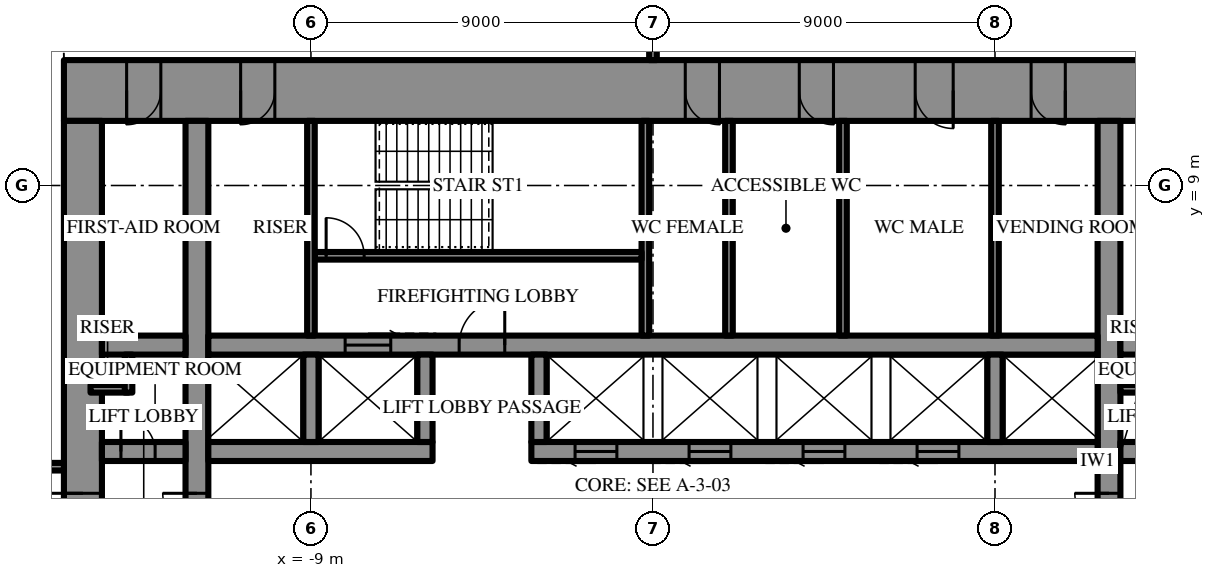
"""IFC4 building model, lengths in metres.
Left out: names, types, materials, properties, quantities, classifications, styles, units other than length and angle.
Written with IfcOpenShell. Run it as: python <this file> out.ifc"""

import sys

from ifc_helpers import new_model, si_unit, direction, frame, frame_2d, origin, place, context, subcontext, project, spatial, rectangle, extrude, element, fill, save


model = new_model("IFC4")
c1 = context("Model", 3, precision=1e-05, world=origin(), true_north=direction((0.0, 1.0)))
c2 = subcontext(c1, "Body", "Model", "MODEL_VIEW")
j1 = project(units=[si_unit("LENGTHUNIT", "METRE"), si_unit("PLANEANGLEUNIT", "RADIAN")], contexts=[c1])
p1 = place(None, origin())
s1 = spatial("IfcSite", under=j1, at=p1, CompositionType="ELEMENT")
p2 = place(p1, origin())
s2 = spatial("IfcBuilding", under=s1, at=p2, CompositionType="ELEMENT")
p3 = place(p2, frame((0.0, 0.0, 257.5)))
s3 = spatial("IfcBuildingStorey", under=s2, at=p3, CompositionType="ELEMENT", Elevation=257.5)
p4 = place(p3, frame((-15.5, 11.5, 0.0), z_axis=(0.0, 0.0, 1.0), x_axis=(1.0, 0.0, 0.0)))
e1 = element("IfcWall", 1, at=p4, inside=s3, PredefinedType="SHEAR", context=c2, shape_type="SweptSolid", body=[
    extrude(rectangle(XDim=31.0, YDim=1.6, at=frame_2d((15.5, 0.0))), origin(), (0.0, 0.0, 1.0), 4.2),
])
p5 = place(p4, frame((16.35, 0.0, 0.0)))
e2 = element("IfcOpeningElement", 2, at=p5, cuts=e1, PredefinedType="OPENING", context=c2, shape_type="SweptSolid", body=[
    extrude(rectangle(XDim=0.9, YDim=2.2, at=frame_2d((0.45, 1.1))), frame((0.0, 0.81, 0.0), z_axis=(0.0, -1.0, 0.0), x_axis=(1.0, 0.0, 0.0)), (0.0, 0.0, 1.0), 1.62),
])
p6 = place(p4, frame((19.35, 0.0, 0.0)))
e3 = element("IfcOpeningElement", 3, at=p6, cuts=e1, PredefinedType="OPENING", context=c2, shape_type="SweptSolid", body=[
    extrude(rectangle(XDim=0.9, YDim=2.2, at=frame_2d((0.45, 1.1))), frame((0.0, 0.81, 0.0), z_axis=(0.0, -1.0, 0.0), x_axis=(1.0, 0.0, 0.0)), (0.0, 0.0, 1.0), 1.62),
])
p7 = place(p4, frame((22.4, 0.0, 0.0)))
e4 = element("IfcOpeningElement", 4, at=p7, cuts=e1, PredefinedType="OPENING", context=c2, shape_type="SweptSolid", body=[
    extrude(rectangle(XDim=1.0, YDim=2.2, at=frame_2d((0.5, 1.1))), frame((0.0, 0.81, 0.0), z_axis=(0.0, -1.0, 0.0), x_axis=(1.0, 0.0, 0.0)), (0.0, 0.0, 1.0), 1.62),
])
p8 = place(p4, frame((1.65, 0.0, 0.0)))
e5 = element("IfcOpeningElement", 5, at=p8, cuts=e1, PredefinedType="OPENING", context=c2, shape_type="SweptSolid", body=[
    extrude(rectangle(XDim=0.9, YDim=2.2, at=frame_2d((0.45, 1.1))), frame((0.0, 0.81, 0.0), z_axis=(0.0, -1.0, 0.0), x_axis=(1.0, 0.0, 0.0)), (0.0, 0.0, 1.0), 1.62),
])
p9 = place(p4, frame((4.65, 0.0, 0.0)))
e6 = element("IfcOpeningElement", 6, at=p9, cuts=e1, PredefinedType="OPENING", context=c2, shape_type="SweptSolid", body=[
    extrude(rectangle(XDim=0.9, YDim=2.2, at=frame_2d((0.45, 1.1))), frame((0.0, 0.81, 0.0), z_axis=(0.0, -1.0, 0.0), x_axis=(1.0, 0.0, 0.0)), (0.0, 0.0, 1.0), 1.62),
])
p10 = place(p4, frame((25.45, 0.0, 0.0)))
e7 = element("IfcOpeningElement", 7, at=p10, cuts=e1, PredefinedType="OPENING", context=c2, shape_type="SweptSolid", body=[
    extrude(rectangle(XDim=0.9, YDim=2.2, at=frame_2d((0.45, 1.1))), frame((0.0, 0.81, 0.0), z_axis=(0.0, -1.0, 0.0), x_axis=(1.0, 0.0, 0.0)), (0.0, 0.0, 1.0), 1.62),
])
p11 = place(p4, frame((28.45, 0.0, 0.0)))
e8 = element("IfcOpeningElement", 8, at=p11, cuts=e1, PredefinedType="OPENING", context=c2, shape_type="SweptSolid", body=[
    extrude(rectangle(XDim=0.9, YDim=2.2, at=frame_2d((0.45, 1.1))), frame((0.0, 0.81, 0.0), z_axis=(0.0, -1.0, 0.0), x_axis=(1.0, 0.0, 0.0)), (0.0, 0.0, 1.0), 1.62),
])
p12 = place(p3, frame((-15.0, 10.7, 0.0), z_axis=(0.0, 0.0, 1.0), x_axis=(0.0, -1.0, 0.0)))
e9 = element("IfcWall", 9, at=p12, inside=s3, PredefinedType="SHEAR", context=c2, shape_type="SweptSolid", body=[
    extrude(rectangle(XDim=21.4, YDim=1.0, at=frame_2d((10.7, 0.0))), origin(), (0.0, 0.0, 1.0), 4.2),
])
p13 = place(p12, frame((9.8, 0.0, 0.0)))
e10 = element("IfcOpeningElement", 10, at=p13, cuts=e9, PredefinedType="OPENING", context=c2, shape_type="SweptSolid", body=[
    extrude(rectangle(XDim=1.8, YDim=2.4, at=frame_2d((0.9, 1.2))), frame((0.0, 0.51, 0.0), z_axis=(0.0, -1.0, 0.0), x_axis=(1.0, 0.0, 0.0)), (0.0, 0.0, 1.0), 1.02),
])
p14 = place(p3, frame((12.0, -10.7, 0.0), z_axis=(0.0, 0.0, 1.0), x_axis=(0.0, 1.0, 0.0)))
e11 = element("IfcWall", 11, at=p14, inside=s3, PredefinedType="SHEAR", context=c2, shape_type="SweptSolid", body=[
    extrude(rectangle(XDim=21.4, YDim=0.6, at=frame_2d((10.7, 0.0))), origin(), (0.0, 0.0, 1.0), 4.2),
])
p15 = place(p14, frame((9.8, 0.0, 0.0)))
e12 = element("IfcOpeningElement", 12, at=p15, cuts=e11, PredefinedType="OPENING", context=c2, shape_type="SweptSolid", body=[
    extrude(rectangle(XDim=1.8, YDim=2.4, at=frame_2d((0.9, 1.2))), frame((0.0, 0.31, 0.0), z_axis=(0.0, -1.0, 0.0), x_axis=(1.0, 0.0, 0.0)), (0.0, 0.0, 1.0), 0.62),
])
p16 = place(p3, frame((-12.0, -10.7, 0.0), z_axis=(0.0, 0.0, 1.0), x_axis=(0.0, 1.0, 0.0)))
e13 = element("IfcWall", 13, at=p16, inside=s3, PredefinedType="SHEAR", context=c2, shape_type="SweptSolid", body=[
    extrude(rectangle(XDim=21.4, YDim=0.6, at=frame_2d((10.7, 0.0))), origin(), (0.0, 0.0, 1.0), 4.2),
])
p17 = place(p16, frame((9.8, 0.0, 0.0)))
e14 = element("IfcOpeningElement", 14, at=p17, cuts=e13, PredefinedType="OPENING", context=c2, shape_type="SweptSolid", body=[
    extrude(rectangle(XDim=1.8, YDim=2.4, at=frame_2d((0.9, 1.2))), frame((0.0, 0.31, 0.0), z_axis=(0.0, -1.0, 0.0), x_axis=(1.0, 0.0, 0.0)), (0.0, 0.0, 1.0), 0.62),
])
p18 = place(p3, frame((-14.5, 2.0, 0.0), z_axis=(0.0, 0.0, 1.0), x_axis=(1.0, 0.0, 0.0)))
e15 = element("IfcWall", 15, at=p18, inside=s3, PredefinedType="SHEAR", context=c2, shape_type="SweptSolid", body=[
    extrude(rectangle(XDim=2.2, YDim=0.5, at=frame_2d((1.1, 0.0))), origin(), (0.0, 0.0, 1.0), 4.2),
])
p19 = place(p18, frame((0.5, 0.0, 0.0)))
e16 = element("IfcOpeningElement", 16, at=p19, cuts=e15, PredefinedType="OPENING", context=c2, shape_type="SweptSolid", body=[
    extrude(rectangle(XDim=0.9, YDim=2.2, at=frame_2d((0.45, 1.1))), frame((0.0, 0.26, 0.0), z_axis=(0.0, -1.0, 0.0), x_axis=(1.0, 0.0, 0.0)), (0.0, 0.0, 1.0), 0.52),
])
p20 = place(p3, frame((-11.7, 2.0, 0.0), z_axis=(0.0, 0.0, 1.0), x_axis=(1.0, 0.0, 0.0)))
e17 = element("IfcWall", 17, at=p20, inside=s3, PredefinedType="SHEAR", context=c2, shape_type="SweptSolid", body=[
    extrude(rectangle(XDim=5.9, YDim=0.5, at=frame_2d((2.95, 0.0))), origin(), (0.0, 0.0, 1.0), 4.2),
])
p21 = place(p3, frame((-3.2, 2.0, 0.0), z_axis=(0.0, 0.0, 1.0), x_axis=(1.0, 0.0, 0.0)))
e18 = element("IfcWall", 18, at=p21, inside=s3, PredefinedType="SHEAR", context=c2, shape_type="SweptSolid", body=[
    extrude(rectangle(XDim=14.9, YDim=0.5, at=frame_2d((7.45, 0.0))), origin(), (0.0, 0.0, 1.0), 4.2),
])
p22 = place(p21, frame((1.15, 0.0, 0.0)))
e19 = element("IfcOpeningElement", 19, at=p22, cuts=e18, PredefinedType="OPENING", context=c2, shape_type="SweptSolid", body=[
    extrude(rectangle(XDim=1.1, YDim=2.2, at=frame_2d((0.55, 1.1))), frame((0.0, 0.26, 0.0), z_axis=(0.0, -1.0, 0.0), x_axis=(1.0, 0.0, 0.0)), (0.0, 0.0, 1.0), 0.52),
])
p23 = place(p21, frame((4.15, 0.0, 0.0)))
e20 = element("IfcOpeningElement", 20, at=p23, cuts=e18, PredefinedType="OPENING", context=c2, shape_type="SweptSolid", body=[
    extrude(rectangle(XDim=1.1, YDim=2.2, at=frame_2d((0.55, 1.1))), frame((0.0, 0.26, 0.0), z_axis=(0.0, -1.0, 0.0), x_axis=(1.0, 0.0, 0.0)), (0.0, 0.0, 1.0), 0.52),
])
p24 = place(p21, frame((7.15, 0.0, 0.0)))
e21 = element("IfcOpeningElement", 21, at=p24, cuts=e18, PredefinedType="OPENING", context=c2, shape_type="SweptSolid", body=[
    extrude(rectangle(XDim=1.1, YDim=2.2, at=frame_2d((0.55, 1.1))), frame((0.0, 0.26, 0.0), z_axis=(0.0, -1.0, 0.0), x_axis=(1.0, 0.0, 0.0)), (0.0, 0.0, 1.0), 0.52),
])
p25 = place(p21, frame((10.15, 0.0, 0.0)))
e22 = element("IfcOpeningElement", 22, at=p25, cuts=e18, PredefinedType="OPENING", context=c2, shape_type="SweptSolid", body=[
    extrude(rectangle(XDim=1.1, YDim=2.2, at=frame_2d((0.55, 1.1))), frame((0.0, 0.26, 0.0), z_axis=(0.0, -1.0, 0.0), x_axis=(1.0, 0.0, 0.0)), (0.0, 0.0, 1.0), 0.52),
])
p26 = place(p3, frame((12.3, 2.0, 0.0), z_axis=(0.0, 0.0, 1.0), x_axis=(1.0, 0.0, 0.0)))
e23 = element("IfcWall", 23, at=p26, inside=s3, PredefinedType="SHEAR", context=c2, shape_type="SweptSolid", body=[
    extrude(rectangle(XDim=2.2, YDim=0.5, at=frame_2d((1.1, 0.0))), origin(), (0.0, 0.0, 1.0), 4.2),
])
p27 = place(p26, frame((0.8, 0.0, 0.0)))
e24 = element("IfcOpeningElement", 24, at=p27, cuts=e23, PredefinedType="OPENING", context=c2, shape_type="SweptSolid", body=[
    extrude(rectangle(XDim=0.9, YDim=2.2, at=frame_2d((0.45, 1.1))), frame((0.0, 0.26, 0.0), z_axis=(0.0, -1.0, 0.0), x_axis=(1.0, 0.0, 0.0)), (0.0, 0.0, 1.0), 0.52),
])
p28 = place(p3, frame((-14.5, 4.8, 0.0), z_axis=(0.0, 0.0, 1.0), x_axis=(1.0, 0.0, 0.0)))
e25 = element("IfcWall", 25, at=p28, inside=s3, PredefinedType="SHEAR", context=c2, shape_type="SweptSolid", body=[
    extrude(rectangle(XDim=2.2, YDim=0.5, at=frame_2d((1.1, 0.0))), origin(), (0.0, 0.0, 1.0), 4.2),
])
p29 = place(p3, frame((-11.7, 4.8, 0.0), z_axis=(0.0, 0.0, 1.0), x_axis=(1.0, 0.0, 0.0)))
e26 = element("IfcWall", 26, at=p29, inside=s3, PredefinedType="SHEAR", context=c2, shape_type="SweptSolid", body=[
    extrude(rectangle(XDim=23.4, YDim=0.5, at=frame_2d((11.7, 0.0))), origin(), (0.0, 0.0, 1.0), 4.2),
])
p30 = place(p29, frame((6.6, 0.0, 0.0)))
e27 = element("IfcOpeningElement", 27, at=p30, cuts=e26, PredefinedType="OPENING", context=c2, shape_type="SweptSolid", body=[
    extrude(rectangle(XDim=1.2, YDim=2.2, at=frame_2d((0.6, 1.1))), frame((0.0, 0.26, 0.0), z_axis=(0.0, -1.0, 0.0), x_axis=(1.0, 0.0, 0.0)), (0.0, 0.0, 1.0), 0.52),
])
p31 = place(p29, frame((3.6, 0.0, 0.0)))
e28 = element("IfcOpeningElement", 28, at=p31, cuts=e26, PredefinedType="OPENING", context=c2, shape_type="SweptSolid", body=[
    extrude(rectangle(XDim=1.2, YDim=2.2, at=frame_2d((0.6, 1.1))), frame((0.0, 0.26, 0.0), z_axis=(0.0, -1.0, 0.0), x_axis=(1.0, 0.0, 0.0)), (0.0, 0.0, 1.0), 0.52),
])
p32 = place(p3, frame((12.3, 4.8, 0.0), z_axis=(0.0, 0.0, 1.0), x_axis=(1.0, 0.0, 0.0)))
e29 = element("IfcWall", 29, at=p32, inside=s3, PredefinedType="SHEAR", context=c2, shape_type="SweptSolid", body=[
    extrude(rectangle(XDim=2.2, YDim=0.5, at=frame_2d((1.1, 0.0))), origin(), (0.0, 0.0, 1.0), 4.2),
])
for number, where, z_axis, x_axis in (
    (30, (-9.0, 2.25, 0.0), (0.0, 0.0, 1.0), (0.0, 1.0, 0.0)),
    (31, (-6.0, 2.25, 0.0), (0.0, 0.0, 1.0), (0.0, 1.0, 0.0)),
    (32, (-3.0, 2.25, 0.0), (0.0, 0.0, 1.0), (0.0, 1.0, 0.0)),
    (33, (9.0, 2.25, 0.0), (0.0, 0.0, 1.0), (0.0, 1.0, 0.0)),
):
    element("IfcWall", number, at=place(p3, frame(where, z_axis=z_axis, x_axis=x_axis)), inside=s3, PredefinedType="SHEAR", context=c2, shape_type="SweptSolid", body=[
        extrude(rectangle(XDim=2.3, YDim=0.4, at=frame_2d((1.15, 0.0))), origin(), (0.0, 0.0, 1.0), 4.2),
    ])
p33 = place(p3, frame((-0.2, 5.05, 0.0), z_axis=(0.0, 0.0, 1.0), x_axis=(0.0, 1.0, 0.0)))
e34 = element("IfcWall", 34, at=p33, inside=s3, PredefinedType="SHEAR", context=c2, shape_type="SweptSolid", body=[
    extrude(rectangle(XDim=5.65, YDim=0.2, at=frame_2d((2.825, 0.0))), origin(), (0.0, 0.0, 1.0), 4.2),
])
p34 = place(p3, frame((-8.9, 7.15, 0.0), z_axis=(0.0, 0.0, 1.0), x_axis=(1.0, 0.0, 0.0)))
e35 = element("IfcWall", 35, at=p34, inside=s3, PredefinedType="SHEAR", context=c2, shape_type="SweptSolid", body=[
    extrude(rectangle(XDim=8.6, YDim=0.2, at=frame_2d((4.3, 0.0))), origin(), (0.0, 0.0, 1.0), 4.2),
])
p35 = place(p34, frame((0.3, 0.0, 0.0)))
e36 = element("IfcOpeningElement", 36, at=p35, cuts=e35, PredefinedType="OPENING", context=c2, shape_type="SweptSolid", body=[
    extrude(rectangle(XDim=1.0, YDim=2.2, at=frame_2d((0.5, 1.1))), frame((0.0, 0.11, 0.0), z_axis=(0.0, -1.0, 0.0), x_axis=(1.0, 0.0, 0.0)), (0.0, 0.0, 1.0), 0.22),
])
for number, where, z_axis, x_axis in (
    (37, (-9.0, 5.05, 0.0), (0.0, 0.0, 1.0), (0.0, 1.0, 0.0)),
    (38, (9.0, 5.05, 0.0), (0.0, 0.0, 1.0), (0.0, 1.0, 0.0)),
    (39, (2.0, 5.05, 0.0), (0.0, 0.0, 1.0), (0.0, 1.0, 0.0)),
    (40, (5.0, 5.05, 0.0), (0.0, 0.0, 1.0), (0.0, 1.0, 0.0)),
):
    element("IfcWall", number, at=place(p3, frame(where, z_axis=z_axis, x_axis=x_axis)), inside=s3, PredefinedType="PARTITIONING", context=c2, shape_type="SweptSolid", body=[
        extrude(rectangle(XDim=5.65, YDim=0.2, at=frame_2d((2.825, 0.0))), origin(), (0.0, 0.0, 1.0), 4.0),
    ])
for number, where, z_axis, x_axis in (
    (41, (-14.8, 3.65, 0.0), (0.0, 0.0, 1.0), (1.0, 0.0, 0.0)),
    (42, (-13.8, 3.55, 0.0), (0.0, 0.0, 1.0), (0.0, 1.0, 0.0)),
    (43, (12.3, 3.65, 0.0), (0.0, 0.0, 1.0), (1.0, 0.0, 0.0)),
):
    element("IfcWall", number, at=place(p3, frame(where, z_axis=z_axis, x_axis=x_axis)), inside=s3, PredefinedType="PARTITIONING", context=c2, shape_type="SweptSolid", body=[
        extrude(rectangle(XDim=1.0, YDim=0.2, at=frame_2d((0.5, 0.0))), origin(), (0.0, 0.0, 1.0), 4.0),
    ])
p36 = place(p3, frame((-15.5, 1.6, 0.0), z_axis=(0.0, 0.0, 1.0), x_axis=(-1.0, 0.0, 0.0)))
e44 = element("IfcWall", 44, at=p36, inside=s3, PredefinedType="PARTITIONING", context=c2, shape_type="SweptSolid", body=[
    extrude(rectangle(XDim=11.7, YDim=0.2, at=frame_2d((5.85, 0.0))), origin(), (0.0, 0.0, 1.0), 4.0),
])
p37 = place(p36, frame((3.01, 0.0, 0.0)))
e45 = element("IfcOpeningElement", 45, at=p37, cuts=e44, PredefinedType="OPENING", context=c2, shape_type="SweptSolid", body=[
    extrude(rectangle(XDim=1.0, YDim=2.2, at=frame_2d((0.5, 1.1))), frame((0.0, 0.11, 0.0), z_axis=(0.0, -1.0, 0.0), x_axis=(1.0, 0.0, 0.0)), (0.0, 0.0, 1.0), 0.22),
])
p38 = place(p3, frame((0.0, 12.3, 0.0), z_axis=(0.0, 0.0, 1.0), x_axis=(0.0, 1.0, 0.0)))
e46 = element("IfcWall", 46, at=p38, inside=s3, PredefinedType="PARTITIONING", context=c2, shape_type="SweptSolid", body=[
    extrude(rectangle(XDim=15.55, YDim=0.2, at=frame_2d((7.775, 0.0))), origin(), (0.0, 0.0, 1.0), 2.992),
])
p39 = place(p38, frame((1.055, 0.0, 0.0)))
e47 = element("IfcOpeningElement", 47, at=p39, cuts=e46, PredefinedType="OPENING", context=c2, shape_type="SweptSolid", body=[
    extrude(rectangle(XDim=1.0, YDim=2.2, at=frame_2d((0.5, 1.1))), frame((0.0, 0.11, 0.0), z_axis=(0.0, -1.0, 0.0), x_axis=(1.0, 0.0, 0.0)), (0.0, 0.0, 1.0), 0.22),
])
p40 = place(p13, frame((1.8, 0.0, 0.0), z_axis=(0.0, 0.0, 1.0), x_axis=(-1.0, 0.0, 0.0)))
e48 = element("IfcDoor", 48, at=p40, inside=s3, OperationType="DOUBLE_DOOR_SINGLE_SWING", PredefinedType="DOOR", context=c2, shape_type="SweptSolid", body=[
    extrude(rectangle(XDim=1.8, YDim=2.4, at=frame_2d((0.9, 1.2))), frame((0.0, 0.025, 0.0), z_axis=(0.0, -1.0, 0.0), x_axis=(1.0, 0.0, 0.0)), (0.0, 0.0, 1.0), 0.05),
])
fill(e10, e48)
p41 = place(p30, origin())
e49 = element("IfcDoor", 49, at=p41, inside=s3, OperationType="SINGLE_SWING_LEFT", PredefinedType="DOOR", context=c2, shape_type="SweptSolid", body=[
    extrude(rectangle(XDim=1.2, YDim=2.2, at=frame_2d((0.6, 1.1))), frame((0.0, 0.025, 0.0), z_axis=(0.0, -1.0, 0.0), x_axis=(1.0, 0.0, 0.0)), (0.0, 0.0, 1.0), 0.05),
])
fill(e27, e49)
p42 = place(p35, origin())
e50 = element("IfcDoor", 50, at=p42, inside=s3, OperationType="SINGLE_SWING_RIGHT", PredefinedType="DOOR", context=c2, shape_type="SweptSolid", body=[
    extrude(rectangle(XDim=1.0, YDim=2.2, at=frame_2d((0.5, 1.1))), frame((0.0, 0.025, 0.0), z_axis=(0.0, -1.0, 0.0), x_axis=(1.0, 0.0, 0.0)), (0.0, 0.0, 1.0), 0.05),
])
fill(e36, e50)
p43 = place(p5, frame((0.9, 0.0, 0.0), z_axis=(0.0, 0.0, 1.0), x_axis=(-1.0, 0.0, 0.0)))
e51 = element("IfcDoor", 51, at=p43, inside=s3, OperationType="SINGLE_SWING_RIGHT", PredefinedType="DOOR", context=c2, shape_type="SweptSolid", body=[
    extrude(rectangle(XDim=0.9, YDim=2.2, at=frame_2d((0.45, 1.1))), frame((0.0, 0.025, 0.0), z_axis=(0.0, -1.0, 0.0), x_axis=(1.0, 0.0, 0.0)), (0.0, 0.0, 1.0), 0.05),
])
fill(e2, e51)
p44 = place(p6, frame((0.9, 0.0, 0.0), z_axis=(0.0, 0.0, 1.0), x_axis=(-1.0, 0.0, 0.0)))
e52 = element("IfcDoor", 52, at=p44, inside=s3, OperationType="SINGLE_SWING_RIGHT", PredefinedType="DOOR", context=c2, shape_type="SweptSolid", body=[
    extrude(rectangle(XDim=0.9, YDim=2.2, at=frame_2d((0.45, 1.1))), frame((0.0, 0.025, 0.0), z_axis=(0.0, -1.0, 0.0), x_axis=(1.0, 0.0, 0.0)), (0.0, 0.0, 1.0), 0.05),
])
fill(e3, e52)
p45 = place(p7, frame((1.0, 0.0, 0.0), z_axis=(0.0, 0.0, 1.0), x_axis=(-1.0, 0.0, 0.0)))
e53 = element("IfcDoor", 53, at=p45, inside=s3, OperationType="SINGLE_SWING_RIGHT", PredefinedType="DOOR", context=c2, shape_type="SweptSolid", body=[
    extrude(rectangle(XDim=1.0, YDim=2.2, at=frame_2d((0.5, 1.1))), frame((0.0, 0.025, 0.0), z_axis=(0.0, -1.0, 0.0), x_axis=(1.0, 0.0, 0.0)), (0.0, 0.0, 1.0), 0.05),
])
fill(e4, e53)
p46 = place(p8, frame((0.9, 0.0, 0.0), z_axis=(0.0, 0.0, 1.0), x_axis=(-1.0, 0.0, 0.0)))
e54 = element("IfcDoor", 54, at=p46, inside=s3, OperationType="SINGLE_SWING_LEFT", PredefinedType="DOOR", context=c2, shape_type="SweptSolid", body=[
    extrude(rectangle(XDim=0.9, YDim=2.2, at=frame_2d((0.45, 1.1))), frame((0.0, 0.025, 0.0), z_axis=(0.0, -1.0, 0.0), x_axis=(1.0, 0.0, 0.0)), (0.0, 0.0, 1.0), 0.05),
])
fill(e5, e54)
p47 = place(p9, frame((0.9, 0.0, 0.0), z_axis=(0.0, 0.0, 1.0), x_axis=(-1.0, 0.0, 0.0)))
e55 = element("IfcDoor", 55, at=p47, inside=s3, OperationType="SINGLE_SWING_LEFT", PredefinedType="DOOR", context=c2, shape_type="SweptSolid", body=[
    extrude(rectangle(XDim=0.9, YDim=2.2, at=frame_2d((0.45, 1.1))), frame((0.0, 0.025, 0.0), z_axis=(0.0, -1.0, 0.0), x_axis=(1.0, 0.0, 0.0)), (0.0, 0.0, 1.0), 0.05),
])
fill(e6, e55)
p48 = place(p10, frame((0.9, 0.0, 0.0), z_axis=(0.0, 0.0, 1.0), x_axis=(-1.0, 0.0, 0.0)))
e56 = element("IfcDoor", 56, at=p48, inside=s3, OperationType="SINGLE_SWING_RIGHT", PredefinedType="DOOR", context=c2, shape_type="SweptSolid", body=[
    extrude(rectangle(XDim=0.9, YDim=2.2, at=frame_2d((0.45, 1.1))), frame((0.0, 0.025, 0.0), z_axis=(0.0, -1.0, 0.0), x_axis=(1.0, 0.0, 0.0)), (0.0, 0.0, 1.0), 0.05),
])
fill(e7, e56)
p49 = place(p19, origin())
e57 = element("IfcDoor", 57, at=p49, inside=s3, OperationType="SINGLE_SWING_RIGHT", PredefinedType="DOOR", context=c2, shape_type="SweptSolid", body=[
    extrude(rectangle(XDim=0.9, YDim=2.2, at=frame_2d((0.45, 1.1))), frame((0.0, 0.025, 0.0), z_axis=(0.0, -1.0, 0.0), x_axis=(1.0, 0.0, 0.0)), (0.0, 0.0, 1.0), 0.05),
])
fill(e16, e57)
p50 = place(p15, origin())
e58 = element("IfcDoor", 58, at=p50, inside=s3, OperationType="DOUBLE_DOOR_SINGLE_SWING", PredefinedType="DOOR", context=c2, shape_type="SweptSolid", body=[
    extrude(rectangle(XDim=1.8, YDim=2.4, at=frame_2d((0.9, 1.2))), frame((0.0, 0.025, 0.0), z_axis=(0.0, -1.0, 0.0), x_axis=(1.0, 0.0, 0.0)), (0.0, 0.0, 1.0), 0.05),
])
fill(e12, e58)
p51 = place(p17, origin())
e59 = element("IfcDoor", 59, at=p51, inside=s3, OperationType="DOUBLE_DOOR_SINGLE_SWING", PredefinedType="DOOR", context=c2, shape_type="SweptSolid", body=[
    extrude(rectangle(XDim=1.8, YDim=2.4, at=frame_2d((0.9, 1.2))), frame((0.0, 0.025, 0.0), z_axis=(0.0, -1.0, 0.0), x_axis=(1.0, 0.0, 0.0)), (0.0, 0.0, 1.0), 0.05),
])
fill(e14, e59)
p52 = place(p31, origin())
e60 = element("IfcDoor", 60, at=p52, inside=s3, OperationType="SLIDING_TO_LEFT", PredefinedType="DOOR", context=c2, shape_type="SweptSolid", body=[
    extrude(rectangle(XDim=1.2, YDim=2.2, at=frame_2d((0.6, 1.1))), frame((0.0, 0.025, 0.0), z_axis=(0.0, -1.0, 0.0), x_axis=(1.0, 0.0, 0.0)), (0.0, 0.0, 1.0), 0.05),
])
fill(e28, e60)
p53 = place(p22, frame((1.1, 0.0, 0.0), z_axis=(0.0, 0.0, 1.0), x_axis=(-1.0, 0.0, 0.0)))
e61 = element("IfcDoor", 61, at=p53, inside=s3, OperationType="SLIDING_TO_LEFT", PredefinedType="DOOR", context=c2, shape_type="SweptSolid", body=[
    extrude(rectangle(XDim=1.1, YDim=2.2, at=frame_2d((0.55, 1.1))), frame((0.0, 0.025, 0.0), z_axis=(0.0, -1.0, 0.0), x_axis=(1.0, 0.0, 0.0)), (0.0, 0.0, 1.0), 0.05),
])
fill(e19, e61)
p54 = place(p23, frame((1.1, 0.0, 0.0), z_axis=(0.0, 0.0, 1.0), x_axis=(-1.0, 0.0, 0.0)))
e62 = element("IfcDoor", 62, at=p54, inside=s3, OperationType="SLIDING_TO_LEFT", PredefinedType="DOOR", context=c2, shape_type="SweptSolid", body=[
    extrude(rectangle(XDim=1.1, YDim=2.2, at=frame_2d((0.55, 1.1))), frame((0.0, 0.025, 0.0), z_axis=(0.0, -1.0, 0.0), x_axis=(1.0, 0.0, 0.0)), (0.0, 0.0, 1.0), 0.05),
])
fill(e20, e62)
p55 = place(p24, frame((1.1, 0.0, 0.0), z_axis=(0.0, 0.0, 1.0), x_axis=(-1.0, 0.0, 0.0)))
e63 = element("IfcDoor", 63, at=p55, inside=s3, OperationType="SLIDING_TO_LEFT", PredefinedType="DOOR", context=c2, shape_type="SweptSolid", body=[
    extrude(rectangle(XDim=1.1, YDim=2.2, at=frame_2d((0.55, 1.1))), frame((0.0, 0.025, 0.0), z_axis=(0.0, -1.0, 0.0), x_axis=(1.0, 0.0, 0.0)), (0.0, 0.0, 1.0), 0.05),
])
fill(e21, e63)
p56 = place(p25, frame((1.1, 0.0, 0.0), z_axis=(0.0, 0.0, 1.0), x_axis=(-1.0, 0.0, 0.0)))
e64 = element("IfcDoor", 64, at=p56, inside=s3, OperationType="SLIDING_TO_LEFT", PredefinedType="DOOR", context=c2, shape_type="SweptSolid", body=[
    extrude(rectangle(XDim=1.1, YDim=2.2, at=frame_2d((0.55, 1.1))), frame((0.0, 0.025, 0.0), z_axis=(0.0, -1.0, 0.0), x_axis=(1.0, 0.0, 0.0)), (0.0, 0.0, 1.0), 0.05),
])
fill(e22, e64)
save(model, sys.argv[1])
